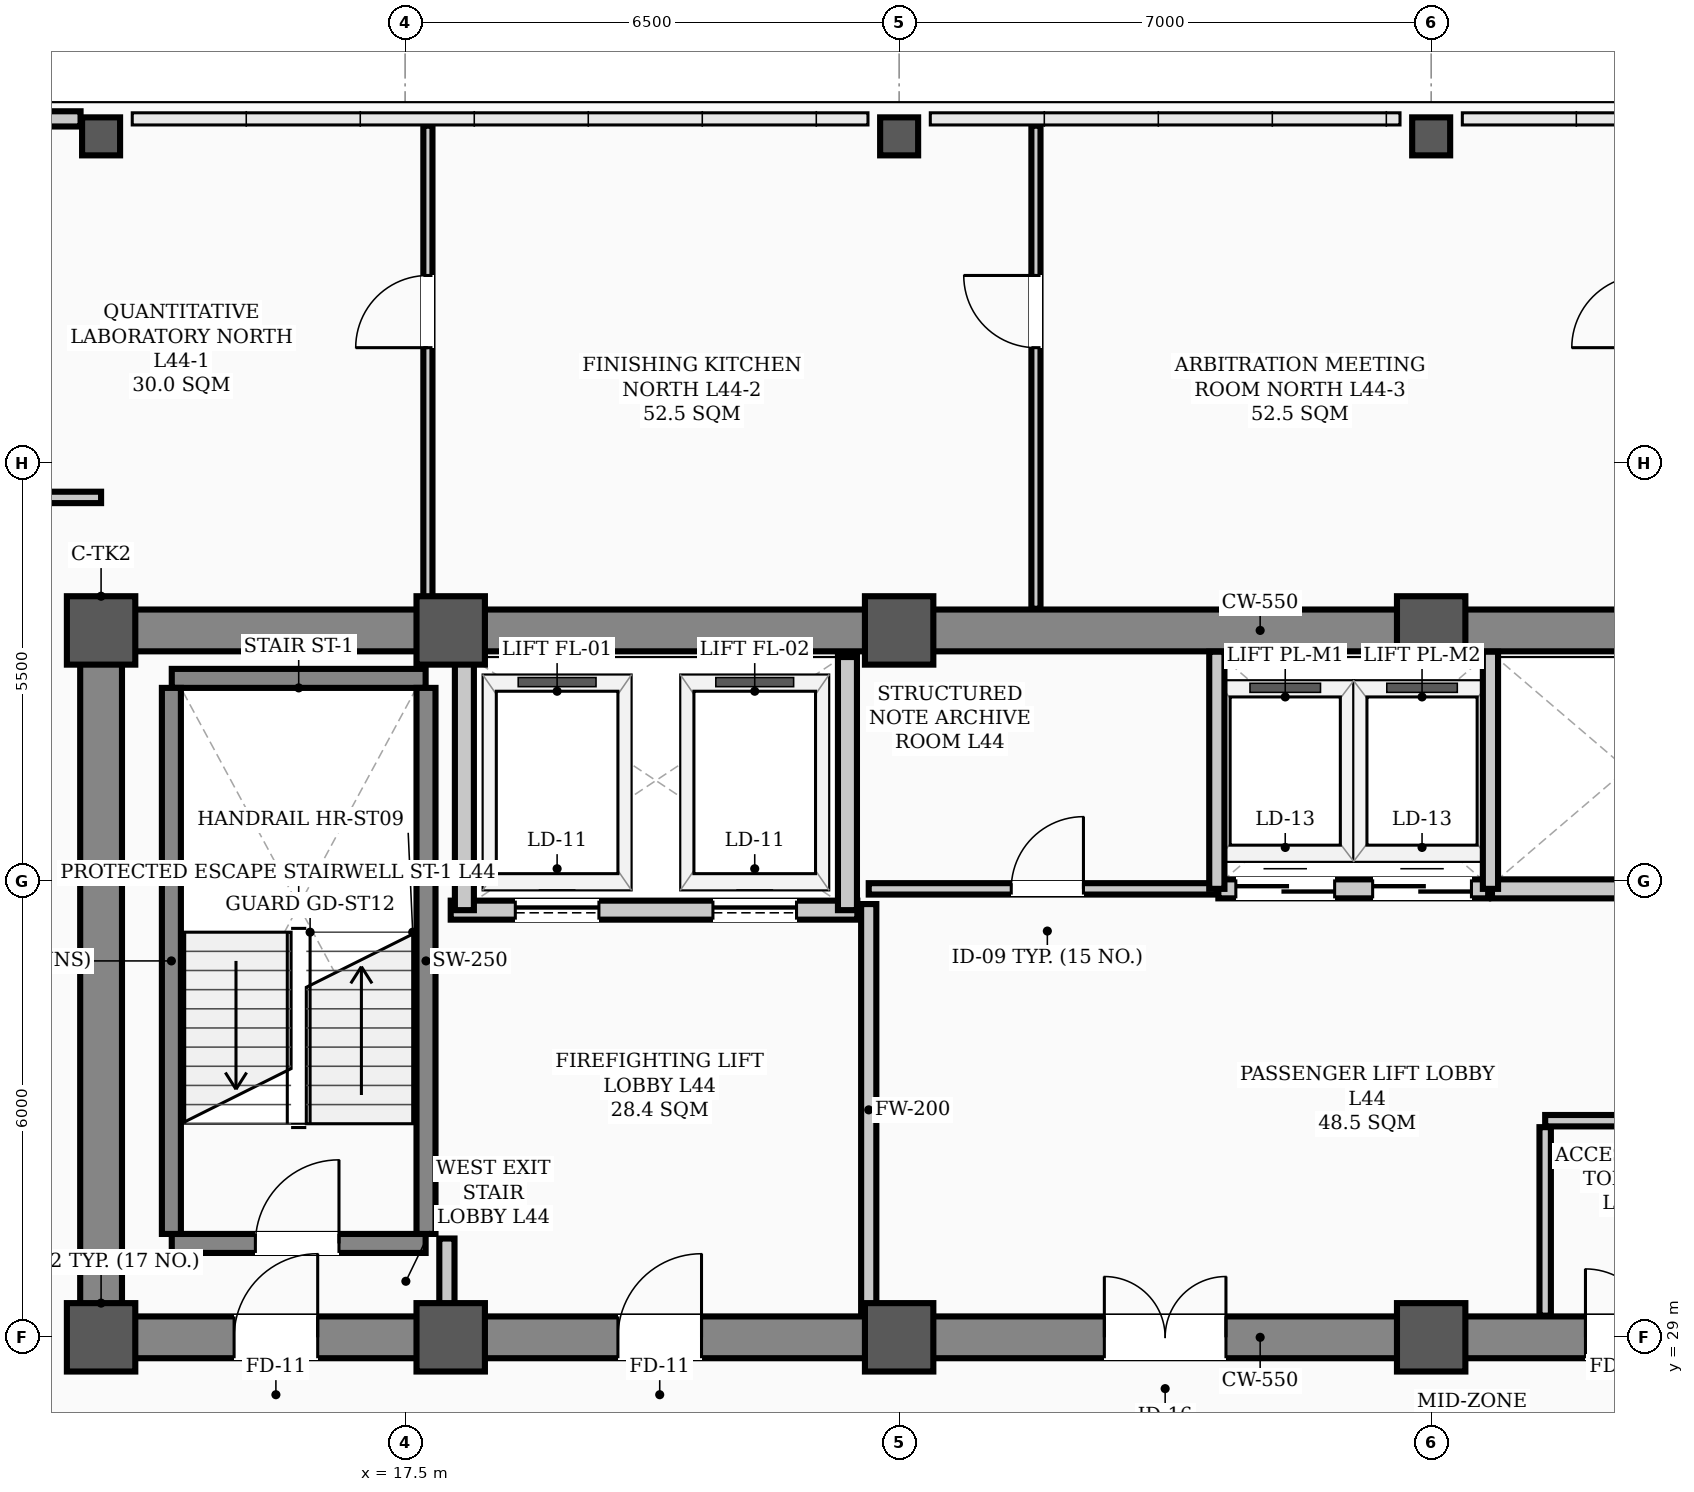
"""IFC4 building model, lengths in metres.
Left out: names, types, materials, properties, quantities, classifications, styles, units other than length and angle.
Written with IfcOpenShell. Run it as: python <this file> out.ifc"""

import sys

from ifc_helpers import new_model, si_unit, direction, frame, frame_2d, origin, origin_2d, place, context, subcontext, project, spatial, rectangle, hollow_rectangle, extrude, element, fill, save


model = new_model("IFC4")
c1 = context("Model", 3, precision=1e-05, world=origin(), true_north=direction((0.0, 1.0)))
c2 = subcontext(c1, "Body", "Model", "MODEL_VIEW")
j1 = project(units=[si_unit("LENGTHUNIT", "METRE"), si_unit("PLANEANGLEUNIT", "RADIAN")], contexts=[c1])
p1 = place(None, origin())
s1 = spatial("IfcSite", under=j1, at=p1, CompositionType="ELEMENT")
p2 = place(p1, origin())
s2 = spatial("IfcBuilding", under=s1, at=p2, CompositionType="ELEMENT")
p3 = place(p2, frame((0.0, 0.0, 177.3)))
s3 = spatial("IfcBuildingStorey", under=s2, at=p3, CompositionType="ELEMENT", Elevation=177.3)
for number, where, z_axis, x_axis in (
    (1, (13.5, 29.0, 0.0), (0.0, 0.0, 1.0), (1.0, 0.0, 0.0)),
    (2, (13.5, 38.3, 0.0), (0.0, 0.0, 1.0), (1.0, 0.0, 0.0)),
    (3, (18.1, 29.0, 0.0), (0.0, 0.0, 1.0), (1.0, 0.0, 0.0)),
    (4, (18.1, 38.3, 0.0), (0.0, 0.0, 1.0), (1.0, 0.0, 0.0)),
    (5, (24.0, 29.0, 0.0), (0.0, 0.0, 1.0), (1.0, 0.0, 0.0)),
    (6, (24.0, 38.3, 0.0), (0.0, 0.0, 1.0), (1.0, 0.0, 0.0)),
    (7, (31.0, 29.0, 0.0), (0.0, 0.0, 1.0), (1.0, 0.0, 0.0)),
    (8, (31.0, 38.3, 0.0), (0.0, 0.0, 1.0), (1.0, 0.0, 0.0)),
):
    element("IfcColumn", number, at=place(p3, frame(where, z_axis=z_axis, x_axis=x_axis)), inside=s3, PredefinedType="COLUMN", context=c2, shape_type="SweptSolid", body=[
        extrude(hollow_rectangle(XDim=0.9, YDim=0.9, WallThickness=0.035, InnerFilletRadius=0.017, OuterFilletRadius=0.052, at=origin_2d()), origin(), (0.0, 0.0, 1.0), 3.9),
    ])
for number, where, z_axis, x_axis in (
    (9, (13.5, 44.8, 0.0), (0.0, 0.0, 1.0), (1.0, 0.0, 0.0)),
    (10, (24.0, 44.8, 0.0), (0.0, 0.0, 1.0), (1.0, 0.0, 0.0)),
    (11, (31.0, 44.8, 0.0), (0.0, 0.0, 1.0), (1.0, 0.0, 0.0)),
):
    element("IfcColumn", number, at=place(p3, frame(where, z_axis=z_axis, x_axis=x_axis)), inside=s3, PredefinedType="COLUMN", context=c2, shape_type="SweptSolid", body=[
        extrude(hollow_rectangle(XDim=0.5, YDim=0.5, WallThickness=0.024, InnerFilletRadius=0.012, OuterFilletRadius=0.036, at=origin_2d()), origin(), (0.0, 0.0, 1.0), 3.9),
    ])
p4 = place(p3, frame((12.6, 45.03, 0.0), z_axis=(0.0, 0.0, 1.0), x_axis=(1.0, 0.0, 0.0)))
e12 = element("IfcWall", 12, at=p4, inside=s3, PredefinedType="PARAPET", context=c2, shape_type="SweptSolid", body=[
    extrude(rectangle(XDim=0.63, YDim=0.2, at=frame_2d((0.315, 0.0))), origin(), (0.0, 0.0, 1.0), 1.2),
])
p5 = place(p3, frame((13.5, 29.0, 0.0), z_axis=(0.0, 0.0, 1.0), x_axis=(1.0, 0.0, 0.0)))
e13 = element("IfcWall", 13, at=p5, inside=s3, PredefinedType="SHEAR", context=c2, shape_type="SweptSolid", body=[
    extrude(rectangle(XDim=30.5, YDim=0.55, at=frame_2d((15.25, 0.0))), origin(), (0.0, 0.0, 1.0), 3.72),
])
p6 = place(p5, frame((1.75, 0.0, 0.0)))
e14 = element("IfcOpeningElement", 14, at=p6, cuts=e13, PredefinedType="OPENING", context=c2, shape_type="SweptSolid", body=[
    extrude(rectangle(XDim=1.1, YDim=2.08, at=frame_2d((0.55, 1.04))), frame((0.0, 0.285, 0.0), z_axis=(0.0, -1.0, 0.0), x_axis=(1.0, 0.0, 0.0)), (0.0, 0.0, 1.0), 0.57),
])
p7 = place(p5, frame((26.7, 0.0, 0.0)))
e15 = element("IfcOpeningElement", 15, at=p7, cuts=e13, PredefinedType="OPENING", context=c2, shape_type="SweptSolid", body=[
    extrude(rectangle(XDim=1.1, YDim=2.08, at=frame_2d((0.55, 1.04))), frame((0.0, 0.285, 0.0), z_axis=(0.0, -1.0, 0.0), x_axis=(1.0, 0.0, 0.0)), (0.0, 0.0, 1.0), 0.57),
])
p8 = place(p5, frame((6.8, 0.0, 0.0)))
e16 = element("IfcOpeningElement", 16, at=p8, cuts=e13, PredefinedType="OPENING", context=c2, shape_type="SweptSolid", body=[
    extrude(rectangle(XDim=1.1, YDim=2.08, at=frame_2d((0.55, 1.04))), frame((0.0, 0.285, 0.0), z_axis=(0.0, -1.0, 0.0), x_axis=(1.0, 0.0, 0.0)), (0.0, 0.0, 1.0), 0.57),
])
p9 = place(p5, frame((13.2, 0.0, 0.0)))
e17 = element("IfcOpeningElement", 17, at=p9, cuts=e13, PredefinedType="OPENING", context=c2, shape_type="SweptSolid", body=[
    extrude(rectangle(XDim=1.6, YDim=2.08, at=frame_2d((0.8, 1.04))), frame((0.0, 0.285, 0.0), z_axis=(0.0, -1.0, 0.0), x_axis=(1.0, 0.0, 0.0)), (0.0, 0.0, 1.0), 0.57),
])
p10 = place(p5, frame((19.53, 0.0, 0.0)))
e18 = element("IfcOpeningElement", 18, at=p10, cuts=e13, PredefinedType="OPENING", context=c2, shape_type="SweptSolid", body=[
    extrude(rectangle(XDim=0.9, YDim=2.08, at=frame_2d((0.45, 1.04))), frame((0.0, 0.285, 0.0), z_axis=(0.0, -1.0, 0.0), x_axis=(1.0, 0.0, 0.0)), (0.0, 0.0, 1.0), 0.57),
])
p11 = place(p5, frame((21.57, 0.0, 0.0)))
e19 = element("IfcOpeningElement", 19, at=p11, cuts=e13, PredefinedType="OPENING", context=c2, shape_type="SweptSolid", body=[
    extrude(rectangle(XDim=0.9, YDim=2.08, at=frame_2d((0.45, 1.04))), frame((0.0, 0.285, 0.0), z_axis=(0.0, -1.0, 0.0), x_axis=(1.0, 0.0, 0.0)), (0.0, 0.0, 1.0), 0.57),
])
p12 = place(p3, frame((13.5, 38.3, 0.0), z_axis=(0.0, 0.0, 1.0), x_axis=(1.0, 0.0, 0.0)))
e20 = element("IfcWall", 20, at=p12, inside=s3, PredefinedType="SHEAR", context=c2, shape_type="SweptSolid", body=[
    extrude(rectangle(XDim=30.5, YDim=0.55, at=frame_2d((15.25, 0.0))), origin(), (0.0, 0.0, 1.0), 3.72),
])
p13 = place(p3, frame((13.5, 29.35, 0.0), z_axis=(0.0, 0.0, 1.0), x_axis=(0.0, 1.0, 0.0)))
e21 = element("IfcWall", 21, at=p13, inside=s3, PredefinedType="SHEAR", context=c2, shape_type="SweptSolid", body=[
    extrude(rectangle(XDim=8.6, YDim=0.55, at=frame_2d((4.3, 0.0))), origin(), (0.0, 0.0, 1.0), 3.72),
])
p14 = place(p3, frame((14.43, 30.235, 0.0), z_axis=(0.0, 0.0, 1.0), x_axis=(1.0, 0.0, 0.0)))
e22 = element("IfcWall", 22, at=p14, inside=s3, PredefinedType="STANDARD", context=c2, shape_type="SweptSolid", body=[
    extrude(rectangle(XDim=3.34, YDim=0.25, at=frame_2d((1.67, 0.0))), origin(), (0.0, 0.0, 1.0), 3.72),
])
p15 = place(p14, frame((1.1, 0.0, 0.0)))
e23 = element("IfcOpeningElement", 23, at=p15, cuts=e22, PredefinedType="OPENING", context=c2, shape_type="SweptSolid", body=[
    extrude(rectangle(XDim=1.1, YDim=2.08, at=frame_2d((0.55, 1.04))), frame((0.0, 0.135, 0.0), z_axis=(0.0, -1.0, 0.0), x_axis=(1.0, 0.0, 0.0)), (0.0, 0.0, 1.0), 0.27),
])
p16 = place(p3, frame((14.43, 37.669, 0.0), z_axis=(0.0, 0.0, 1.0), x_axis=(1.0, 0.0, 0.0)))
e24 = element("IfcWall", 24, at=p16, inside=s3, PredefinedType="STANDARD", context=c2, shape_type="SweptSolid", body=[
    extrude(rectangle(XDim=3.34, YDim=0.25, at=frame_2d((1.67, 0.0))), origin(), (0.0, 0.0, 1.0), 3.72),
])
for number, where, z_axis, x_axis in (
    (25, (14.425, 30.36, 0.0), (0.0, 0.0, 1.0), (0.0, 1.0, 0.0)),
    (26, (17.775, 30.36, 0.0), (0.0, 0.0, 1.0), (0.0, 1.0, 0.0)),
):
    element("IfcWall", number, at=place(p3, frame(where, z_axis=z_axis, x_axis=x_axis)), inside=s3, PredefinedType="STANDARD", context=c2, shape_type="SweptSolid", body=[
        extrude(rectangle(XDim=7.184, YDim=0.25, at=frame_2d((3.592, 0.0))), origin(), (0.0, 0.0, 1.0), 3.72),
    ])
p17 = place(p3, frame((18.1, 34.62, 0.0), z_axis=(0.0, 0.0, 1.0), x_axis=(1.0, 0.0, 0.0)))
e27 = element("IfcWall", 27, at=p17, inside=s3, PredefinedType="STANDARD", context=c2, shape_type="SweptSolid", body=[
    extrude(rectangle(XDim=5.35, YDim=0.25, at=frame_2d((2.675, 0.0))), origin(), (0.0, 0.0, 1.0), 3.72),
])
p18 = place(p17, frame((0.85, 0.0, 0.0)))
e28 = element("IfcOpeningElement", 28, at=p18, cuts=e27, PredefinedType="OPENING", context=c2, shape_type="SweptSolid", body=[
    extrude(rectangle(XDim=1.1, YDim=2.08, at=frame_2d((0.55, 1.04))), frame((0.0, 0.135, 0.0), z_axis=(0.0, -1.0, 0.0), x_axis=(1.0, 0.0, 0.0)), (0.0, 0.0, 1.0), 0.27),
])
p19 = place(p17, frame((3.45, 0.0, 0.0)))
e29 = element("IfcOpeningElement", 29, at=p19, cuts=e27, PredefinedType="OPENING", context=c2, shape_type="SweptSolid", body=[
    extrude(rectangle(XDim=1.1, YDim=2.08, at=frame_2d((0.55, 1.04))), frame((0.0, 0.135, 0.0), z_axis=(0.0, -1.0, 0.0), x_axis=(1.0, 0.0, 0.0)), (0.0, 0.0, 1.0), 0.27),
])
for number, where, z_axis, x_axis in (
    (30, (18.28, 34.62, 0.0), (0.0, 0.0, 1.0), (0.0, 1.0, 0.0)),
    (31, (23.32, 34.62, 0.0), (0.0, 0.0, 1.0), (0.0, 1.0, 0.0)),
):
    element("IfcWall", number, at=place(p3, frame(where, z_axis=z_axis, x_axis=x_axis)), inside=s3, PredefinedType="STANDARD", context=c2, shape_type="SweptSolid", body=[
        extrude(rectangle(XDim=3.33, YDim=0.25, at=frame_2d((1.665, 0.0))), origin(), (0.0, 0.0, 1.0), 3.35),
    ])
p20 = place(p3, frame((28.2, 34.9, 0.0), z_axis=(0.0, 0.0, 1.0), x_axis=(1.0, 0.0, 0.0)))
e32 = element("IfcWall", 32, at=p20, inside=s3, PredefinedType="STANDARD", context=c2, shape_type="SweptSolid", body=[
    extrude(rectangle(XDim=3.55, YDim=0.25, at=frame_2d((1.775, 0.0))), origin(), (0.0, 0.0, 1.0), 3.72),
])
p21 = place(p20, frame((0.23, 0.0, 0.0)))
e33 = element("IfcOpeningElement", 33, at=p21, cuts=e32, PredefinedType="OPENING", context=c2, shape_type="SweptSolid", body=[
    extrude(rectangle(XDim=1.3, YDim=2.08, at=frame_2d((0.65, 1.04))), frame((0.0, 0.135, 0.0), z_axis=(0.0, -1.0, 0.0), x_axis=(1.0, 0.0, 0.0)), (0.0, 0.0, 1.0), 0.27),
])
p22 = place(p20, frame((2.03, 0.0, 0.0)))
e34 = element("IfcOpeningElement", 34, at=p22, cuts=e32, PredefinedType="OPENING", context=c2, shape_type="SweptSolid", body=[
    extrude(rectangle(XDim=1.3, YDim=2.08, at=frame_2d((0.65, 1.04))), frame((0.0, 0.135, 0.0), z_axis=(0.0, -1.0, 0.0), x_axis=(1.0, 0.0, 0.0)), (0.0, 0.0, 1.0), 0.27),
])
p23 = place(p3, frame((31.8, 34.9, 0.0), z_axis=(0.0, 0.0, 1.0), x_axis=(1.0, 0.0, 0.0)))
e35 = element("IfcWall", 35, at=p23, inside=s3, PredefinedType="STANDARD", context=c2, shape_type="SweptSolid", body=[
    extrude(rectangle(XDim=3.6, YDim=0.25, at=frame_2d((1.8, 0.0))), origin(), (0.0, 0.0, 1.0), 3.72),
])
p24 = place(p3, frame((23.6, 34.9, 0.0), z_axis=(0.0, 0.0, 1.0), x_axis=(1.0, 0.0, 0.0)))
e36 = element("IfcWall", 36, at=p24, inside=s3, PredefinedType="PARTITIONING", context=c2, shape_type="SweptSolid", body=[
    extrude(rectangle(XDim=4.58, YDim=0.15, at=frame_2d((2.29, 0.0))), origin(), (0.0, 0.0, 1.0), 3.72),
])
p25 = place(p24, frame((1.875, 0.0, 0.0)))
e37 = element("IfcOpeningElement", 37, at=p25, cuts=e36, PredefinedType="OPENING", context=c2, shape_type="SweptSolid", body=[
    extrude(rectangle(XDim=0.95, YDim=2.08, at=frame_2d((0.475, 1.04))), frame((0.0, 0.085, 0.0), z_axis=(0.0, -1.0, 0.0), x_axis=(1.0, 0.0, 0.0)), (0.0, 0.0, 1.0), 0.17),
])
p26 = place(p3, frame((32.5, 31.85, 0.0), z_axis=(0.0, 0.0, 1.0), x_axis=(1.0, 0.0, 0.0)))
e38 = element("IfcWall", 38, at=p26, inside=s3, PredefinedType="PARTITIONING", context=c2, shape_type="SweptSolid", body=[
    extrude(rectangle(XDim=4.1, YDim=0.15, at=frame_2d((2.05, 0.0))), origin(), (0.0, 0.0, 1.0), 3.72),
])
p27 = place(p3, frame((10.31, 40.05, 0.0), z_axis=(0.0, 0.0, 1.0), x_axis=(1.0, 0.0, 0.0)))
e39 = element("IfcWall", 39, at=p27, inside=s3, PredefinedType="PARTITIONING", context=c2, shape_type="SweptSolid", body=[
    extrude(rectangle(XDim=3.19, YDim=0.15, at=frame_2d((1.595, 0.0))), origin(), (0.0, 0.0, 1.0), 3.2),
])
p28 = place(p3, frame((18.05, 29.285, 0.0), z_axis=(0.0, 0.0, 1.0), x_axis=(0.0, 1.0, 0.0)))
e40 = element("IfcWall", 40, at=p28, inside=s3, PredefinedType="STANDARD", context=c2, shape_type="SweptSolid", body=[
    extrude(rectangle(XDim=1.015, YDim=0.2, at=frame_2d((0.508, 0.0))), origin(), (0.0, 0.0, 1.0), 3.35),
])
p29 = place(p3, frame((23.6, 29.285, 0.0), z_axis=(0.0, 0.0, 1.0), x_axis=(0.0, 1.0, 0.0)))
e41 = element("IfcWall", 41, at=p29, inside=s3, PredefinedType="STANDARD", context=c2, shape_type="SweptSolid", body=[
    extrude(rectangle(XDim=5.415, YDim=0.2, at=frame_2d((2.708, 0.0))), origin(), (0.0, 0.0, 1.0), 3.2),
])
p30 = place(p3, frame((32.5, 29.285, 0.0), z_axis=(0.0, 0.0, 1.0), x_axis=(0.0, 1.0, 0.0)))
e42 = element("IfcWall", 42, at=p30, inside=s3, PredefinedType="PARTITIONING", context=c2, shape_type="SweptSolid", body=[
    extrude(rectangle(XDim=2.48, YDim=0.15, at=frame_2d((1.24, 0.0))), origin(), (0.0, 0.0, 1.0), 3.35),
])
p31 = place(p3, frame((17.8, 38.585, 0.0), z_axis=(0.0, 0.0, 1.0), x_axis=(0.0, 1.0, 0.0)))
e43 = element("IfcWall", 43, at=p31, inside=s3, PredefinedType="PARTITIONING", context=c2, shape_type="SweptSolid", body=[
    extrude(rectangle(XDim=6.355, YDim=0.12, at=frame_2d((3.177, 0.0))), origin(), (0.0, 0.0, 1.0), 3.212),
])
p32 = place(p31, frame((3.435, 0.0, 0.0)))
e44 = element("IfcOpeningElement", 44, at=p32, cuts=e43, PredefinedType="OPENING", context=c2, shape_type="SweptSolid", body=[
    extrude(rectangle(XDim=0.95, YDim=2.08, at=frame_2d((0.475, 1.04))), frame((0.0, 0.07, 0.0), z_axis=(0.0, -1.0, 0.0), x_axis=(1.0, 0.0, 0.0)), (0.0, 0.0, 1.0), 0.14),
])
p33 = place(p3, frame((25.8, 38.585, 0.0), z_axis=(0.0, 0.0, 1.0), x_axis=(0.0, 1.0, 0.0)))
e45 = element("IfcWall", 45, at=p33, inside=s3, PredefinedType="PARTITIONING", context=c2, shape_type="SweptSolid", body=[
    extrude(rectangle(XDim=6.355, YDim=0.12, at=frame_2d((3.177, 0.0))), origin(), (0.0, 0.0, 1.0), 3.212),
])
p34 = place(p33, frame((3.435, 0.0, 0.0)))
e46 = element("IfcOpeningElement", 46, at=p34, cuts=e45, PredefinedType="OPENING", context=c2, shape_type="SweptSolid", body=[
    extrude(rectangle(XDim=0.95, YDim=2.08, at=frame_2d((0.475, 1.04))), frame((0.0, 0.07, 0.0), z_axis=(0.0, -1.0, 0.0), x_axis=(1.0, 0.0, 0.0)), (0.0, 0.0, 1.0), 0.14),
])
for number, where, z_axis, x_axis in (
    (47, (28.18, 34.9, 0.0), (0.0, 0.0, 1.0), (0.0, 1.0, 0.0)),
    (48, (31.78, 34.9, 0.0), (0.0, 0.0, 1.0), (0.0, 1.0, 0.0)),
):
    element("IfcWall", number, at=place(p3, frame(where, z_axis=z_axis, x_axis=x_axis)), inside=s3, PredefinedType="STANDARD", context=c2, shape_type="SweptSolid", body=[
        extrude(rectangle(XDim=3.12, YDim=0.2, at=frame_2d((1.56, 0.0))), origin(), (0.0, 0.0, 1.0), 3.35),
    ])
p35 = place(p15, origin())
e49 = element("IfcDoor", 49, at=p35, inside=s3, OperationType="SINGLE_SWING_RIGHT", PredefinedType="DOOR", context=c2, shape_type="SweptSolid", body=[
    extrude(rectangle(XDim=1.1, YDim=2.08, at=frame_2d((0.55, 1.04))), frame((0.0, 0.025, 0.0), z_axis=(0.0, -1.0, 0.0), x_axis=(1.0, 0.0, 0.0)), (0.0, 0.0, 1.0), 0.05),
])
fill(e23, e49)
p36 = place(p6, origin())
e50 = element("IfcDoor", 50, at=p36, inside=s3, OperationType="SINGLE_SWING_RIGHT", PredefinedType="DOOR", context=c2, shape_type="SweptSolid", body=[
    extrude(rectangle(XDim=1.1, YDim=2.08, at=frame_2d((0.55, 1.04))), frame((0.0, 0.025, 0.0), z_axis=(0.0, -1.0, 0.0), x_axis=(1.0, 0.0, 0.0)), (0.0, 0.0, 1.0), 0.05),
])
fill(e14, e50)
p37 = place(p8, origin())
e51 = element("IfcDoor", 51, at=p37, inside=s3, OperationType="SINGLE_SWING_RIGHT", PredefinedType="DOOR", context=c2, shape_type="SweptSolid", body=[
    extrude(rectangle(XDim=1.1, YDim=2.08, at=frame_2d((0.55, 1.04))), frame((0.0, 0.025, 0.0), z_axis=(0.0, -1.0, 0.0), x_axis=(1.0, 0.0, 0.0)), (0.0, 0.0, 1.0), 0.05),
])
fill(e16, e51)
p38 = place(p9, origin())
e52 = element("IfcDoor", 52, at=p38, inside=s3, OperationType="DOUBLE_DOOR_SINGLE_SWING", PredefinedType="DOOR", context=c2, shape_type="SweptSolid", body=[
    extrude(rectangle(XDim=1.6, YDim=2.08, at=frame_2d((0.8, 1.04))), frame((0.0, 0.025, 0.0), z_axis=(0.0, -1.0, 0.0), x_axis=(1.0, 0.0, 0.0)), (0.0, 0.0, 1.0), 0.05),
])
fill(e17, e52)
p39 = place(p25, origin())
e53 = element("IfcDoor", 53, at=p39, inside=s3, OperationType="SINGLE_SWING_RIGHT", PredefinedType="DOOR", context=c2, shape_type="SweptSolid", body=[
    extrude(rectangle(XDim=0.95, YDim=2.08, at=frame_2d((0.475, 1.04))), frame((0.0, 0.025, 0.0), z_axis=(0.0, -1.0, 0.0), x_axis=(1.0, 0.0, 0.0)), (0.0, 0.0, 1.0), 0.05),
])
fill(e37, e53)
p40 = place(p10, origin())
e54 = element("IfcDoor", 54, at=p40, inside=s3, OperationType="SINGLE_SWING_LEFT", PredefinedType="DOOR", context=c2, shape_type="SweptSolid", body=[
    extrude(rectangle(XDim=0.9, YDim=2.08, at=frame_2d((0.45, 1.04))), frame((0.0, 0.025, 0.0), z_axis=(0.0, -1.0, 0.0), x_axis=(1.0, 0.0, 0.0)), (0.0, 0.0, 1.0), 0.05),
])
fill(e18, e54)
p41 = place(p32, origin())
e55 = element("IfcDoor", 55, at=p41, inside=s3, OperationType="SINGLE_SWING_LEFT", PredefinedType="DOOR", context=c2, shape_type="SweptSolid", body=[
    extrude(rectangle(XDim=0.95, YDim=2.08, at=frame_2d((0.475, 1.04))), frame((0.0, 0.025, 0.0), z_axis=(0.0, -1.0, 0.0), x_axis=(1.0, 0.0, 0.0)), (0.0, 0.0, 1.0), 0.05),
])
fill(e44, e55)
p42 = place(p34, origin())
e56 = element("IfcDoor", 56, at=p42, inside=s3, OperationType="SINGLE_SWING_RIGHT", PredefinedType="DOOR", context=c2, shape_type="SweptSolid", body=[
    extrude(rectangle(XDim=0.95, YDim=2.08, at=frame_2d((0.475, 1.04))), frame((0.0, 0.025, 0.0), z_axis=(0.0, -1.0, 0.0), x_axis=(1.0, 0.0, 0.0)), (0.0, 0.0, 1.0), 0.05),
])
fill(e46, e56)
p43 = place(p18, origin())
e57 = element("IfcDoor", 57, at=p43, inside=s3, OperationType="SLIDING_TO_LEFT", PredefinedType="DOOR", context=c2, shape_type="SweptSolid", body=[
    extrude(rectangle(XDim=1.1, YDim=2.08, at=frame_2d((0.55, 1.04))), frame((0.0, 0.025, 0.0), z_axis=(0.0, -1.0, 0.0), x_axis=(1.0, 0.0, 0.0)), (0.0, 0.0, 1.0), 0.05),
])
fill(e28, e57)
p44 = place(p19, origin())
e58 = element("IfcDoor", 58, at=p44, inside=s3, OperationType="SLIDING_TO_LEFT", PredefinedType="DOOR", context=c2, shape_type="SweptSolid", body=[
    extrude(rectangle(XDim=1.1, YDim=2.08, at=frame_2d((0.55, 1.04))), frame((0.0, 0.025, 0.0), z_axis=(0.0, -1.0, 0.0), x_axis=(1.0, 0.0, 0.0)), (0.0, 0.0, 1.0), 0.05),
])
fill(e29, e58)
p45 = place(p21, origin())
e59 = element("IfcDoor", 59, at=p45, inside=s3, OperationType="DOUBLE_DOOR_SLIDING", PredefinedType="DOOR", context=c2, shape_type="SweptSolid", body=[
    extrude(rectangle(XDim=1.3, YDim=2.08, at=frame_2d((0.65, 1.04))), frame((0.0, 0.025, 0.0), z_axis=(0.0, -1.0, 0.0), x_axis=(1.0, 0.0, 0.0)), (0.0, 0.0, 1.0), 0.05),
])
fill(e33, e59)
p46 = place(p22, origin())
e60 = element("IfcDoor", 60, at=p46, inside=s3, OperationType="DOUBLE_DOOR_SLIDING", PredefinedType="DOOR", context=c2, shape_type="SweptSolid", body=[
    extrude(rectangle(XDim=1.3, YDim=2.08, at=frame_2d((0.65, 1.04))), frame((0.0, 0.025, 0.0), z_axis=(0.0, -1.0, 0.0), x_axis=(1.0, 0.0, 0.0)), (0.0, 0.0, 1.0), 0.05),
])
fill(e34, e60)
save(model, sys.argv[1])
